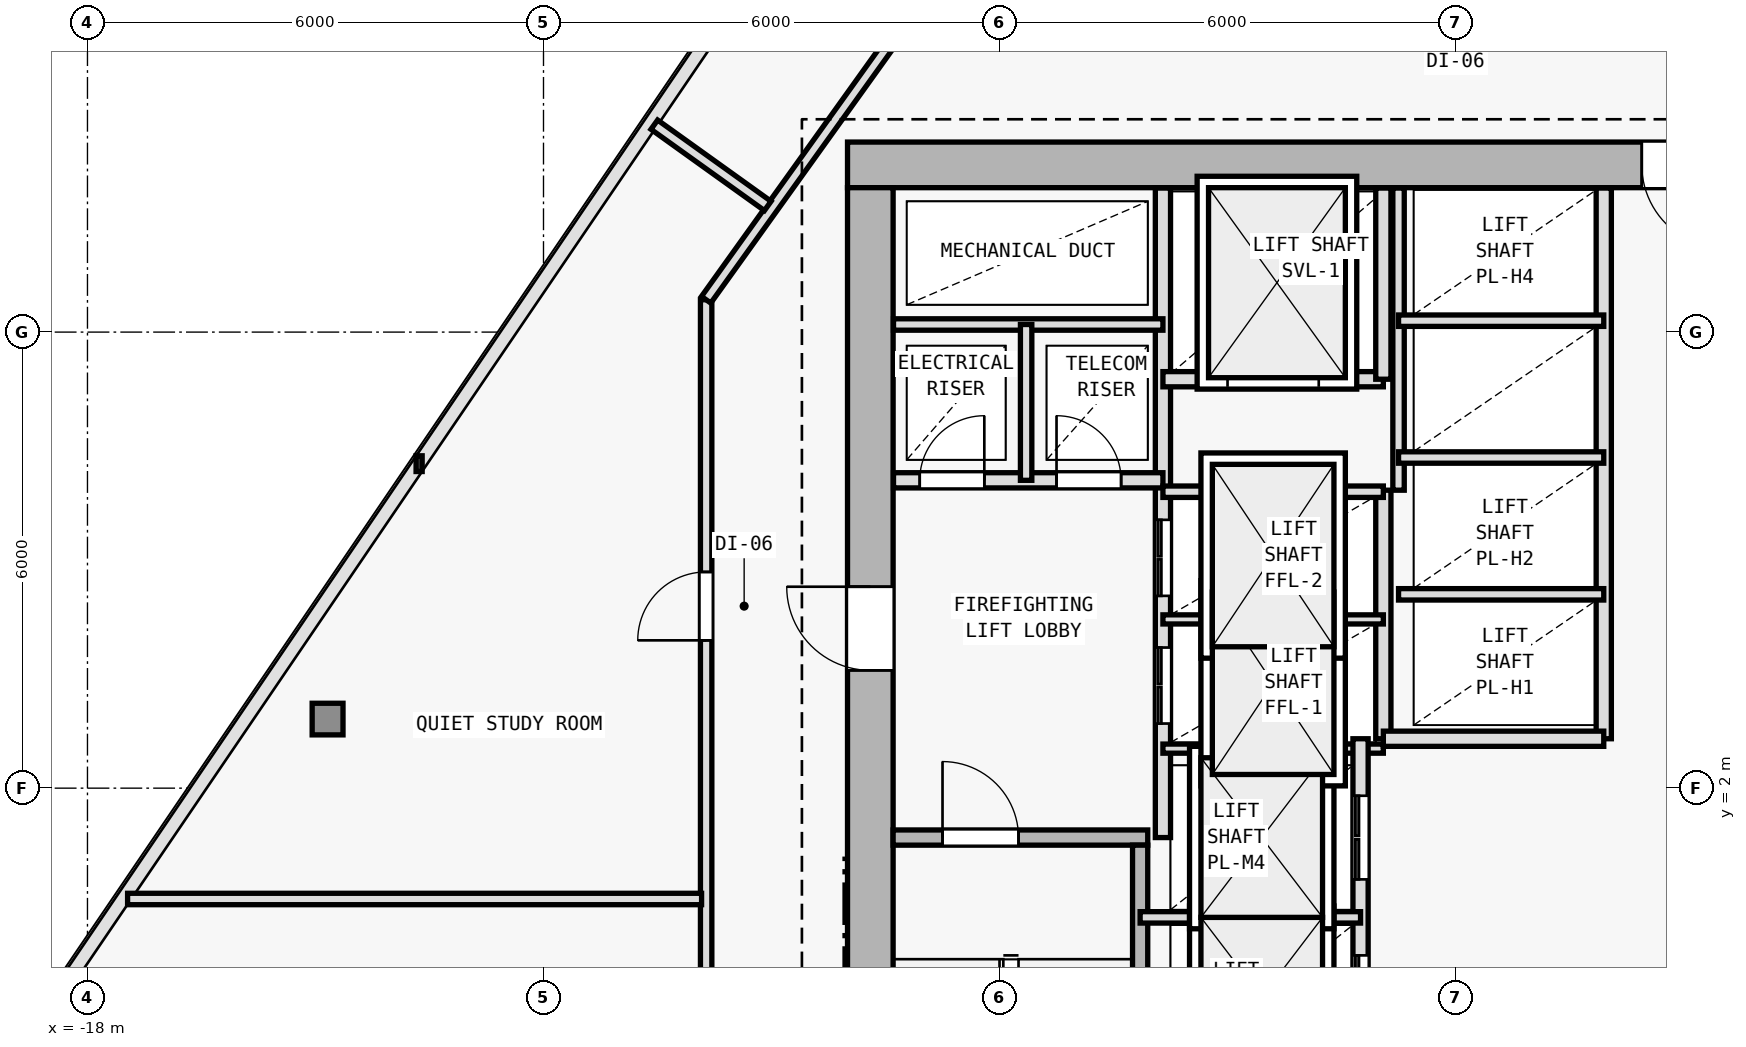
"""IFC4 building model, lengths in metres.
Left out: names, types, materials, properties, quantities, classifications, styles, units other than length and angle.
Written with IfcOpenShell. Run it as: python <this file> out.ifc"""

import sys

from ifc_helpers import new_model, si_unit, direction, frame, frame_2d, origin, origin_2d, place, context, subcontext, project, spatial, rectangle, i_section, extrude, element, fill, save


model = new_model("IFC4")
c1 = context("Model", 3, precision=1e-05, world=origin(), true_north=direction((0.0, 1.0)))
c2 = subcontext(c1, "Body", "Model", "MODEL_VIEW")
j1 = project(units=[si_unit("LENGTHUNIT", "METRE"), si_unit("PLANEANGLEUNIT", "RADIAN")], contexts=[c1])
p1 = place(None, origin())
s1 = spatial("IfcSite", under=j1, at=p1, CompositionType="ELEMENT")
p2 = place(p1, origin())
s2 = spatial("IfcBuilding", under=s1, at=p2, CompositionType="ELEMENT")
p3 = place(p2, frame((0.0, 0.0, 107.7)))
s3 = spatial("IfcBuildingStorey", under=s2, at=p3, CompositionType="ELEMENT", Elevation=107.7)
for number, where, z_axis, x_axis in (
    (1, (-7.7, 10.2, 0.0), (0.0, 0.0, 1.0), (1.0, 0.0, 0.0)),
    (2, (-7.7, 2.0, 0.0), (0.0, 0.0, 1.0), (1.0, 0.0, 0.0)),
):
    element("IfcColumn", number, at=place(p3, frame(where, z_axis=z_axis, x_axis=x_axis)), inside=s3, PredefinedType="COLUMN", context=c2, shape_type="SweptSolid", body=[
        extrude(i_section(OverallWidth=0.409, OverallDepth=0.425, WebThickness=0.021, FlangeThickness=0.034, FilletRadius=0.015, at=origin_2d()), origin(), (0.0, 0.0, 1.0), 3.6),
    ])
p4 = place(p3, frame((-14.841, 2.909, 0.006), z_axis=(0.017479483538, 0.009793951865, 0.999799252931), x_axis=(-0.488810085697, 0.87239022239, 0.0)))
e3 = element("IfcColumn", 3, at=p4, inside=s3, PredefinedType="COLUMN", context=c2, shape_type="SweptSolid", body=[
    extrude(i_section(OverallWidth=0.406, OverallDepth=0.416, WebThickness=0.019, FlangeThickness=0.031, FilletRadius=0.015, at=origin_2d()), origin(), (0.0, 0.0, 1.0), 3.59),
])
p5 = place(p3, frame((8.0, 10.2, 0.0), z_axis=(0.0, 0.0, 1.0), x_axis=(-1.0, 0.0, 0.0)))
e4 = element("IfcWall", 4, at=p5, inside=s3, PredefinedType="SHEAR", context=c2, shape_type="SweptSolid", body=[
    extrude(rectangle(XDim=16.0, YDim=0.6, at=frame_2d((8.0, 0.0))), origin(), (0.0, 0.0, 1.0), 3.35),
])
p6 = place(p5, frame((4.45, 0.0, 0.0)))
e5 = element("IfcOpeningElement", 5, at=p6, cuts=e4, PredefinedType="OPENING", context=c2, shape_type="SweptSolid", body=[
    extrude(rectangle(XDim=1.1, YDim=2.15, at=frame_2d((0.55, 1.075))), frame((0.0, 0.31, 0.0), z_axis=(0.0, -1.0, 0.0), x_axis=(1.0, 0.0, 0.0)), (0.0, 0.0, 1.0), 0.62),
])
p7 = place(p3, frame((-7.7, -9.1, 0.0), z_axis=(0.0, 0.0, 1.0), x_axis=(0.0, 1.0, 0.0)))
e6 = element("IfcWall", 6, at=p7, inside=s3, PredefinedType="SHEAR", context=c2, shape_type="SweptSolid", body=[
    extrude(rectangle(XDim=19.0, YDim=0.6, at=frame_2d((9.5, 0.0))), origin(), (0.0, 0.0, 1.0), 3.35),
])
p8 = place(p7, frame((12.65, 0.0, 0.0)))
e7 = element("IfcOpeningElement", 7, at=p8, cuts=e6, PredefinedType="OPENING", context=c2, shape_type="SweptSolid", body=[
    extrude(rectangle(XDim=1.1, YDim=2.15, at=frame_2d((0.55, 1.075))), frame((0.0, 0.31, 0.0), z_axis=(0.0, -1.0, 0.0), x_axis=(1.0, 0.0, 0.0)), (0.0, 0.0, 1.0), 0.62),
])
p9 = place(p3, frame((-7.4, 1.35, 0.0), z_axis=(0.0, 0.0, 1.0), x_axis=(1.0, 0.0, 0.0)))
e8 = element("IfcWall", 8, at=p9, inside=s3, PredefinedType="SOLIDWALL", context=c2, shape_type="SweptSolid", body=[
    extrude(rectangle(XDim=3.35, YDim=0.2, at=frame_2d((1.675, 0.0))), origin(), (0.0, 0.0, 1.0), 3.35),
])
p10 = place(p9, frame((0.65, 0.0, 0.0)))
e9 = element("IfcOpeningElement", 9, at=p10, cuts=e8, PredefinedType="OPENING", context=c2, shape_type="SweptSolid", body=[
    extrude(rectangle(XDim=1.0, YDim=2.15, at=frame_2d((0.5, 1.075))), frame((0.0, 0.11, 0.0), z_axis=(0.0, -1.0, 0.0), x_axis=(1.0, 0.0, 0.0)), (0.0, 0.0, 1.0), 0.22),
])
p11 = place(p3, frame((-4.15, -5.95, 0.0), z_axis=(0.0, 0.0, 1.0), x_axis=(0.0, 1.0, 0.0)))
e10 = element("IfcWall", 10, at=p11, inside=s3, PredefinedType="SOLIDWALL", context=c2, shape_type="SweptSolid", body=[
    extrude(rectangle(XDim=7.2, YDim=0.2, at=frame_2d((3.6, 0.0))), origin(), (0.0, 0.0, 1.0), 3.35),
])
p12 = place(p3, frame((-3.85, 1.35, 0.0), z_axis=(0.0, 0.0, 1.0), x_axis=(0.0, 1.0, 0.0)))
e11 = element("IfcWall", 11, at=p12, inside=s3, PredefinedType="SOLIDWALL", context=c2, shape_type="SweptSolid", body=[
    extrude(rectangle(XDim=8.545, YDim=0.2, at=frame_2d((4.272, 0.0))), origin(), (0.0, 0.0, 1.0), 3.35),
])
p13 = place(p12, frame((1.5, 0.0, 0.0)))
e12 = element("IfcOpeningElement", 12, at=p13, cuts=e11, PredefinedType="OPENING", context=c2, shape_type="SweptSolid", body=[
    extrude(rectangle(XDim=1.0, YDim=2.15, at=frame_2d((0.5, 1.075))), frame((0.0, 0.11, 0.0), z_axis=(0.0, -1.0, 0.0), x_axis=(1.0, 0.0, 0.0)), (0.0, 0.0, 1.0), 0.22),
])
p14 = place(p12, frame((3.18, 0.0, 0.0)))
e13 = element("IfcOpeningElement", 13, at=p14, cuts=e11, PredefinedType="OPENING", context=c2, shape_type="SweptSolid", body=[
    extrude(rectangle(XDim=1.0, YDim=2.15, at=frame_2d((0.5, 1.075))), frame((0.0, 0.11, 0.0), z_axis=(0.0, -1.0, 0.0), x_axis=(1.0, 0.0, 0.0)), (0.0, 0.0, 1.0), 0.22),
])
p15 = place(p3, frame((-7.395, 6.05, 0.0), z_axis=(0.0, 0.0, 1.0), x_axis=(1.0, 0.0, 0.0)))
e14 = element("IfcWall", 14, at=p15, inside=s3, PredefinedType="SOLIDWALL", context=c2, shape_type="SweptSolid", body=[
    extrude(rectangle(XDim=3.545, YDim=0.2, at=frame_2d((1.772, 0.0))), origin(), (0.0, 0.0, 1.0), 3.35),
])
p16 = place(p15, frame((0.345, 0.0, 0.0)))
e15 = element("IfcOpeningElement", 15, at=p16, cuts=e14, PredefinedType="OPENING", context=c2, shape_type="SweptSolid", body=[
    extrude(rectangle(XDim=0.85, YDim=2.1, at=frame_2d((0.425, 1.05))), frame((0.0, 0.11, 0.0), z_axis=(0.0, -1.0, 0.0), x_axis=(1.0, 0.0, 0.0)), (0.0, 0.0, 1.0), 0.22),
])
p17 = place(p15, frame((2.145, 0.0, 0.0)))
e16 = element("IfcOpeningElement", 16, at=p17, cuts=e14, PredefinedType="OPENING", context=c2, shape_type="SweptSolid", body=[
    extrude(rectangle(XDim=0.85, YDim=2.1, at=frame_2d((0.425, 1.05))), frame((0.0, 0.11, 0.0), z_axis=(0.0, -1.0, 0.0), x_axis=(1.0, 0.0, 0.0)), (0.0, 0.0, 1.0), 0.22),
])
p18 = place(p3, frame((-7.395, 8.1, 0.0), z_axis=(0.0, 0.0, 1.0), x_axis=(1.0, 0.0, 0.0)))
e17 = element("IfcWall", 17, at=p18, inside=s3, PredefinedType="PARTITIONING", context=c2, shape_type="SweptSolid", body=[
    extrude(rectangle(XDim=3.545, YDim=0.15, at=frame_2d((1.772, 0.0))), origin(), (0.0, 0.0, 1.0), 3.35),
])
p19 = place(p3, frame((-5.65, 6.05, 0.0), z_axis=(0.0, 0.0, 1.0), x_axis=(0.0, 1.0, 0.0)))
e18 = element("IfcWall", 18, at=p19, inside=s3, PredefinedType="PARTITIONING", context=c2, shape_type="SweptSolid", body=[
    extrude(rectangle(XDim=2.05, YDim=0.15, at=frame_2d((1.025, 0.0))), origin(), (0.0, 0.0, 1.0), 3.35),
])
p20 = place(p3, frame((-0.95, 2.65, 0.0), z_axis=(0.0, 0.0, 1.0), x_axis=(0.0, 1.0, 0.0)))
e19 = element("IfcWall", 19, at=p20, inside=s3, PredefinedType="SOLIDWALL", context=c2, shape_type="SweptSolid", body=[
    extrude(rectangle(XDim=3.27, YDim=0.2, at=frame_2d((1.635, 0.0))), origin(), (0.0, 0.0, 1.0), 3.35),
])
for number, where, z_axis, x_axis in (
    (20, (-3.85, 2.52, 0.0), (0.0, 0.0, 1.0), (1.0, 0.0, 0.0)),
    (21, (-3.85, 4.22, 0.0), (0.0, 0.0, 1.0), (1.0, 0.0, 0.0)),
):
    element("IfcWall", number, at=place(p3, frame(where, z_axis=z_axis, x_axis=x_axis)), inside=s3, PredefinedType="PARTITIONING", context=c2, shape_type="SweptSolid", body=[
        extrude(rectangle(XDim=2.9, YDim=0.12, at=frame_2d((1.45, 0.0))), origin(), (0.0, 0.0, 1.0), 3.35),
    ])
p21 = place(p3, frame((-3.85, 5.9, 0.0), z_axis=(0.0, 0.0, 1.0), x_axis=(1.0, 0.0, 0.0)))
e22 = element("IfcWall", 22, at=p21, inside=s3, PredefinedType="PARTITIONING", context=c2, shape_type="SweptSolid", body=[
    extrude(rectangle(XDim=2.9, YDim=0.15, at=frame_2d((1.45, 0.0))), origin(), (0.0, 0.0, 1.0), 3.35),
])
p22 = place(p3, frame((-3.85, 7.38, 0.0), z_axis=(0.0, 0.0, 1.0), x_axis=(1.0, 0.0, 0.0)))
e23 = element("IfcWall", 23, at=p22, inside=s3, PredefinedType="SOLIDWALL", context=c2, shape_type="SweptSolid", body=[
    extrude(rectangle(XDim=2.9, YDim=0.2, at=frame_2d((1.45, 0.0))), origin(), (0.0, 0.0, 1.0), 3.35),
])
p23 = place(p22, frame((0.85, 0.0, 0.0)))
e24 = element("IfcOpeningElement", 24, at=p23, cuts=e23, PredefinedType="OPENING", context=c2, shape_type="SweptSolid", body=[
    extrude(rectangle(XDim=1.2, YDim=2.2, at=frame_2d((0.6, 1.1))), frame((0.0, 0.11, 0.0), z_axis=(0.0, -1.0, 0.0), x_axis=(1.0, 0.0, 0.0)), (0.0, 0.0, 1.0), 0.22),
])
p24 = place(p3, frame((-0.95, 7.38, 0.0), z_axis=(0.0, 0.0, 1.0), x_axis=(0.0, 1.0, 0.0)))
e25 = element("IfcWall", 25, at=p24, inside=s3, PredefinedType="SOLIDWALL", context=c2, shape_type="SweptSolid", body=[
    extrude(rectangle(XDim=2.515, YDim=0.2, at=frame_2d((1.258, 0.0))), origin(), (0.0, 0.0, 1.0), 3.35),
])
p25 = place(p3, frame((-1.25, -6.05, 0.0), z_axis=(0.0, 0.0, 1.0), x_axis=(0.0, 1.0, 0.0)))
e26 = element("IfcWall", 26, at=p25, inside=s3, PredefinedType="SOLIDWALL", context=c2, shape_type="SweptSolid", body=[
    extrude(rectangle(XDim=8.7, YDim=0.2, at=frame_2d((4.35, 0.0))), origin(), (0.0, 0.0, 1.0), 3.35),
])
p26 = place(p25, frame((0.55, 0.0, 0.0)))
e27 = element("IfcOpeningElement", 27, at=p26, cuts=e26, PredefinedType="OPENING", context=c2, shape_type="SweptSolid", body=[
    extrude(rectangle(XDim=1.1, YDim=2.15, at=frame_2d((0.55, 1.075))), frame((0.0, 0.11, 0.0), z_axis=(0.0, -1.0, 0.0), x_axis=(1.0, 0.0, 0.0)), (0.0, 0.0, 1.0), 0.22),
])
p27 = place(p25, frame((2.65, 0.0, 0.0)))
e28 = element("IfcOpeningElement", 28, at=p27, cuts=e26, PredefinedType="OPENING", context=c2, shape_type="SweptSolid", body=[
    extrude(rectangle(XDim=1.1, YDim=2.15, at=frame_2d((0.55, 1.075))), frame((0.0, 0.11, 0.0), z_axis=(0.0, -1.0, 0.0), x_axis=(1.0, 0.0, 0.0)), (0.0, 0.0, 1.0), 0.22),
])
p28 = place(p25, frame((4.75, 0.0, 0.0)))
e29 = element("IfcOpeningElement", 29, at=p28, cuts=e26, PredefinedType="OPENING", context=c2, shape_type="SweptSolid", body=[
    extrude(rectangle(XDim=1.1, YDim=2.15, at=frame_2d((0.55, 1.075))), frame((0.0, 0.11, 0.0), z_axis=(0.0, -1.0, 0.0), x_axis=(1.0, 0.0, 0.0)), (0.0, 0.0, 1.0), 0.22),
])
p29 = place(p25, frame((6.85, 0.0, 0.0)))
e30 = element("IfcOpeningElement", 30, at=p29, cuts=e26, PredefinedType="OPENING", context=c2, shape_type="SweptSolid", body=[
    extrude(rectangle(XDim=1.1, YDim=2.15, at=frame_2d((0.55, 1.075))), frame((0.0, 0.11, 0.0), z_axis=(0.0, -1.0, 0.0), x_axis=(1.0, 0.0, 0.0)), (0.0, 0.0, 1.0), 0.22),
])
p30 = place(p3, frame((-4.15, 0.3, 0.0), z_axis=(0.0, 0.0, 1.0), x_axis=(1.0, 0.0, 0.0)))
e31 = element("IfcWall", 31, at=p30, inside=s3, PredefinedType="PARTITIONING", context=c2, shape_type="SweptSolid", body=[
    extrude(rectangle(XDim=2.9, YDim=0.15, at=frame_2d((1.45, 0.0))), origin(), (0.0, 0.0, 1.0), 3.35),
])
p31 = place(p3, frame((1.95, 2.65, 0.0), z_axis=(0.0, 0.0, 1.0), x_axis=(0.0, 1.0, 0.0)))
e32 = element("IfcWall", 32, at=p31, inside=s3, PredefinedType="SOLIDWALL", context=c2, shape_type="SweptSolid", body=[
    extrude(rectangle(XDim=7.245, YDim=0.2, at=frame_2d((3.623, 0.0))), origin(), (0.0, 0.0, 1.0), 3.35),
])
p32 = place(p3, frame((-0.95, 2.65, 0.0), z_axis=(0.0, 0.0, 1.0), x_axis=(1.0, 0.0, 0.0)))
e33 = element("IfcWall", 33, at=p32, inside=s3, PredefinedType="SOLIDWALL", context=c2, shape_type="SweptSolid", body=[
    extrude(rectangle(XDim=2.9, YDim=0.2, at=frame_2d((1.45, 0.0))), origin(), (0.0, 0.0, 1.0), 3.35),
])
p33 = place(p3, frame((-0.75, 5.92, 0.0), z_axis=(0.0, 0.0, 1.0), x_axis=(0.0, 1.0, 0.0)))
e34 = element("IfcWall", 34, at=p33, inside=s3, PredefinedType="PARTITIONING", context=c2, shape_type="SweptSolid", body=[
    extrude(rectangle(XDim=3.975, YDim=0.15, at=frame_2d((1.988, 0.0))), origin(), (0.0, 0.0, 1.0), 3.35),
])
for number, where, z_axis, x_axis in (
    (35, (-0.75, 4.55, 0.0), (0.0, 0.0, 1.0), (1.0, 0.0, 0.0)),
    (36, (-0.75, 6.35, 0.0), (0.0, 0.0, 1.0), (1.0, 0.0, 0.0)),
    (37, (-0.75, 8.15, 0.0), (0.0, 0.0, 1.0), (1.0, 0.0, 0.0)),
):
    element("IfcWall", number, at=place(p3, frame(where, z_axis=z_axis, x_axis=x_axis)), inside=s3, PredefinedType="PARTITIONING", context=c2, shape_type="SweptSolid", body=[
        extrude(rectangle(XDim=2.7, YDim=0.15, at=frame_2d((1.35, 0.0))), origin(), (0.0, 0.0, 1.0), 3.35),
    ])
p34 = place(p3, frame((-9.86, -11.56, 0.0), z_axis=(0.0, 0.0, 1.0), x_axis=(0.0, 1.0, 0.0)))
e38 = element("IfcWall", 38, at=p34, inside=s3, PredefinedType="PARTITIONING", context=c2, shape_type="SweptSolid", body=[
    extrude(rectangle(XDim=19.986, YDim=0.15, at=frame_2d((9.993, 0.0))), origin(), (0.0, 0.0, 1.0), 2.705),
])
p35 = place(p34, frame((9.664, 0.0, 0.0)))
e39 = element("IfcOpeningElement", 39, at=p35, cuts=e38, PredefinedType="OPENING", context=c2, shape_type="SweptSolid", body=[
    extrude(rectangle(XDim=0.9, YDim=2.1, at=frame_2d((0.45, 1.05))), frame((0.0, 0.085, 0.0), z_axis=(0.0, -1.0, 0.0), x_axis=(1.0, 0.0, 0.0)), (0.0, 0.0, 1.0), 0.17),
])
p36 = place(p34, frame((6.498, 0.0, 0.0)))
e40 = element("IfcOpeningElement", 40, at=p36, cuts=e38, PredefinedType="OPENING", context=c2, shape_type="SweptSolid", body=[
    extrude(rectangle(XDim=0.9, YDim=2.1, at=frame_2d((0.45, 1.05))), frame((0.0, 0.085, 0.0), z_axis=(0.0, -1.0, 0.0), x_axis=(1.0, 0.0, 0.0)), (0.0, 0.0, 1.0), 0.17),
])
p37 = place(p34, frame((4.144, 0.0, 0.0)))
e41 = element("IfcOpeningElement", 41, at=p37, cuts=e38, PredefinedType="OPENING", context=c2, shape_type="SweptSolid", body=[
    extrude(rectangle(XDim=0.9, YDim=2.1, at=frame_2d((0.45, 1.05))), frame((0.0, 0.085, 0.0), z_axis=(0.0, -1.0, 0.0), x_axis=(1.0, 0.0, 0.0)), (0.0, 0.0, 1.0), 0.17),
])
p38 = place(p34, frame((15.505, 0.0, 0.0)))
e42 = element("IfcOpeningElement", 42, at=p38, cuts=e38, PredefinedType="OPENING", context=c2, shape_type="SweptSolid", body=[
    extrude(rectangle(XDim=0.9, YDim=2.1, at=frame_2d((0.45, 1.05))), frame((0.0, 0.085, 0.0), z_axis=(0.0, -1.0, 0.0), x_axis=(1.0, 0.0, 0.0)), (0.0, 0.0, 1.0), 0.17),
])
p39 = place(p3, frame((-9.86, 8.426, 0.0), z_axis=(0.0, 0.0, 1.0), x_axis=(0.582449511476, 0.812866881218, 0.0)))
e43 = element("IfcWall", 43, at=p39, inside=s3, PredefinedType="PARTITIONING", context=c2, shape_type="SweptSolid", body=[
    extrude(rectangle(XDim=4.84, YDim=0.15, at=frame_2d((2.42, 0.0))), origin(), (0.0, 0.0, 1.0), 2.775),
])
p40 = place(p3, frame((-9.92, 0.542, 0.0), z_axis=(0.0, 0.0, 1.0), x_axis=(-1.0, 0.0, 0.0)))
e44 = element("IfcWall", 44, at=p40, inside=s3, PredefinedType="PARTITIONING", context=c2, shape_type="SweptSolid", body=[
    extrude(rectangle(XDim=7.552, YDim=0.15, at=frame_2d((3.776, 0.0))), origin(), (0.0, 0.0, 1.0), 2.825),
])
p41 = place(p3, frame((-9.05, 9.66, 0.0), z_axis=(0.0, 0.0, 1.0), x_axis=(-0.81283391876, 0.582495511153, 0.0)))
e45 = element("IfcWall", 45, at=p41, inside=s3, PredefinedType="PARTITIONING", context=c2, shape_type="SweptSolid", body=[
    extrude(rectangle(XDim=1.836, YDim=0.15, at=frame_2d((0.918, 0.0))), origin(), (0.0, 0.0, 1.0), 2.835),
])
p42 = place(p8, origin())
e46 = element("IfcDoor", 46, at=p42, inside=s3, OperationType="SINGLE_SWING_RIGHT", PredefinedType="DOOR", context=c2, shape_type="SweptSolid", body=[
    extrude(rectangle(XDim=1.1, YDim=2.15, at=frame_2d((0.55, 1.075))), frame((0.0, 0.025, 0.0), z_axis=(0.0, -1.0, 0.0), x_axis=(1.0, 0.0, 0.0)), (0.0, 0.0, 1.0), 0.05),
])
fill(e7, e46)
p43 = place(p6, origin())
e47 = element("IfcDoor", 47, at=p43, inside=s3, OperationType="SINGLE_SWING_LEFT", PredefinedType="DOOR", context=c2, shape_type="SweptSolid", body=[
    extrude(rectangle(XDim=1.1, YDim=2.15, at=frame_2d((0.55, 1.075))), frame((0.0, 0.025, 0.0), z_axis=(0.0, -1.0, 0.0), x_axis=(1.0, 0.0, 0.0)), (0.0, 0.0, 1.0), 0.05),
])
fill(e5, e47)
p44 = place(p10, origin())
e48 = element("IfcDoor", 48, at=p44, inside=s3, OperationType="SINGLE_SWING_LEFT", PredefinedType="DOOR", context=c2, shape_type="SweptSolid", body=[
    extrude(rectangle(XDim=1.0, YDim=2.15, at=frame_2d((0.5, 1.075))), frame((0.0, 0.025, 0.0), z_axis=(0.0, -1.0, 0.0), x_axis=(1.0, 0.0, 0.0)), (0.0, 0.0, 1.0), 0.05),
])
fill(e9, e48)
p45 = place(p16, origin())
e49 = element("IfcDoor", 49, at=p45, inside=s3, OperationType="SINGLE_SWING_RIGHT", PredefinedType="DOOR", context=c2, shape_type="SweptSolid", body=[
    extrude(rectangle(XDim=0.85, YDim=2.1, at=frame_2d((0.425, 1.05))), frame((0.0, 0.025, 0.0), z_axis=(0.0, -1.0, 0.0), x_axis=(1.0, 0.0, 0.0)), (0.0, 0.0, 1.0), 0.05),
])
fill(e15, e49)
p46 = place(p17, origin())
e50 = element("IfcDoor", 50, at=p46, inside=s3, OperationType="SINGLE_SWING_LEFT", PredefinedType="DOOR", context=c2, shape_type="SweptSolid", body=[
    extrude(rectangle(XDim=0.85, YDim=2.1, at=frame_2d((0.425, 1.05))), frame((0.0, 0.025, 0.0), z_axis=(0.0, -1.0, 0.0), x_axis=(1.0, 0.0, 0.0)), (0.0, 0.0, 1.0), 0.05),
])
fill(e16, e50)
p47 = place(p23, origin())
e51 = element("IfcDoor", 51, at=p47, inside=s3, OperationType="DOUBLE_DOOR_SLIDING", PredefinedType="DOOR", context=c2, shape_type="SweptSolid", body=[
    extrude(rectangle(XDim=1.2, YDim=2.2, at=frame_2d((0.6, 1.1))), frame((0.0, 0.025, 0.0), z_axis=(0.0, -1.0, 0.0), x_axis=(1.0, 0.0, 0.0)), (0.0, 0.0, 1.0), 0.05),
])
fill(e24, e51)
p48 = place(p28, origin())
e52 = element("IfcDoor", 52, at=p48, inside=s3, OperationType="DOUBLE_DOOR_SLIDING", PredefinedType="DOOR", context=c2, shape_type="SweptSolid", body=[
    extrude(rectangle(XDim=1.1, YDim=2.15, at=frame_2d((0.55, 1.075))), frame((0.0, 0.025, 0.0), z_axis=(0.0, -1.0, 0.0), x_axis=(1.0, 0.0, 0.0)), (0.0, 0.0, 1.0), 0.05),
])
fill(e29, e52)
p49 = place(p29, origin())
e53 = element("IfcDoor", 53, at=p49, inside=s3, OperationType="DOUBLE_DOOR_SLIDING", PredefinedType="DOOR", context=c2, shape_type="SweptSolid", body=[
    extrude(rectangle(XDim=1.1, YDim=2.15, at=frame_2d((0.55, 1.075))), frame((0.0, 0.025, 0.0), z_axis=(0.0, -1.0, 0.0), x_axis=(1.0, 0.0, 0.0)), (0.0, 0.0, 1.0), 0.05),
])
fill(e30, e53)
p50 = place(p13, origin())
e54 = element("IfcDoor", 54, at=p50, inside=s3, OperationType="DOUBLE_DOOR_SLIDING", PredefinedType="DOOR", context=c2, shape_type="SweptSolid", body=[
    extrude(rectangle(XDim=1.0, YDim=2.15, at=frame_2d((0.5, 1.075))), frame((0.0, 0.025, 0.0), z_axis=(0.0, -1.0, 0.0), x_axis=(1.0, 0.0, 0.0)), (0.0, 0.0, 1.0), 0.05),
])
fill(e12, e54)
p51 = place(p14, origin())
e55 = element("IfcDoor", 55, at=p51, inside=s3, OperationType="DOUBLE_DOOR_SLIDING", PredefinedType="DOOR", context=c2, shape_type="SweptSolid", body=[
    extrude(rectangle(XDim=1.0, YDim=2.15, at=frame_2d((0.5, 1.075))), frame((0.0, 0.025, 0.0), z_axis=(0.0, -1.0, 0.0), x_axis=(1.0, 0.0, 0.0)), (0.0, 0.0, 1.0), 0.05),
])
fill(e13, e55)
p52 = place(p38, origin())
e56 = element("IfcDoor", 56, at=p52, inside=s3, OperationType="SINGLE_SWING_LEFT", PredefinedType="DOOR", context=c2, shape_type="SweptSolid", body=[
    extrude(rectangle(XDim=0.9, YDim=2.1, at=frame_2d((0.45, 1.05))), frame((0.0, 0.025, 0.0), z_axis=(0.0, -1.0, 0.0), x_axis=(1.0, 0.0, 0.0)), (0.0, 0.0, 1.0), 0.05),
])
fill(e42, e56)
save(model, sys.argv[1])
